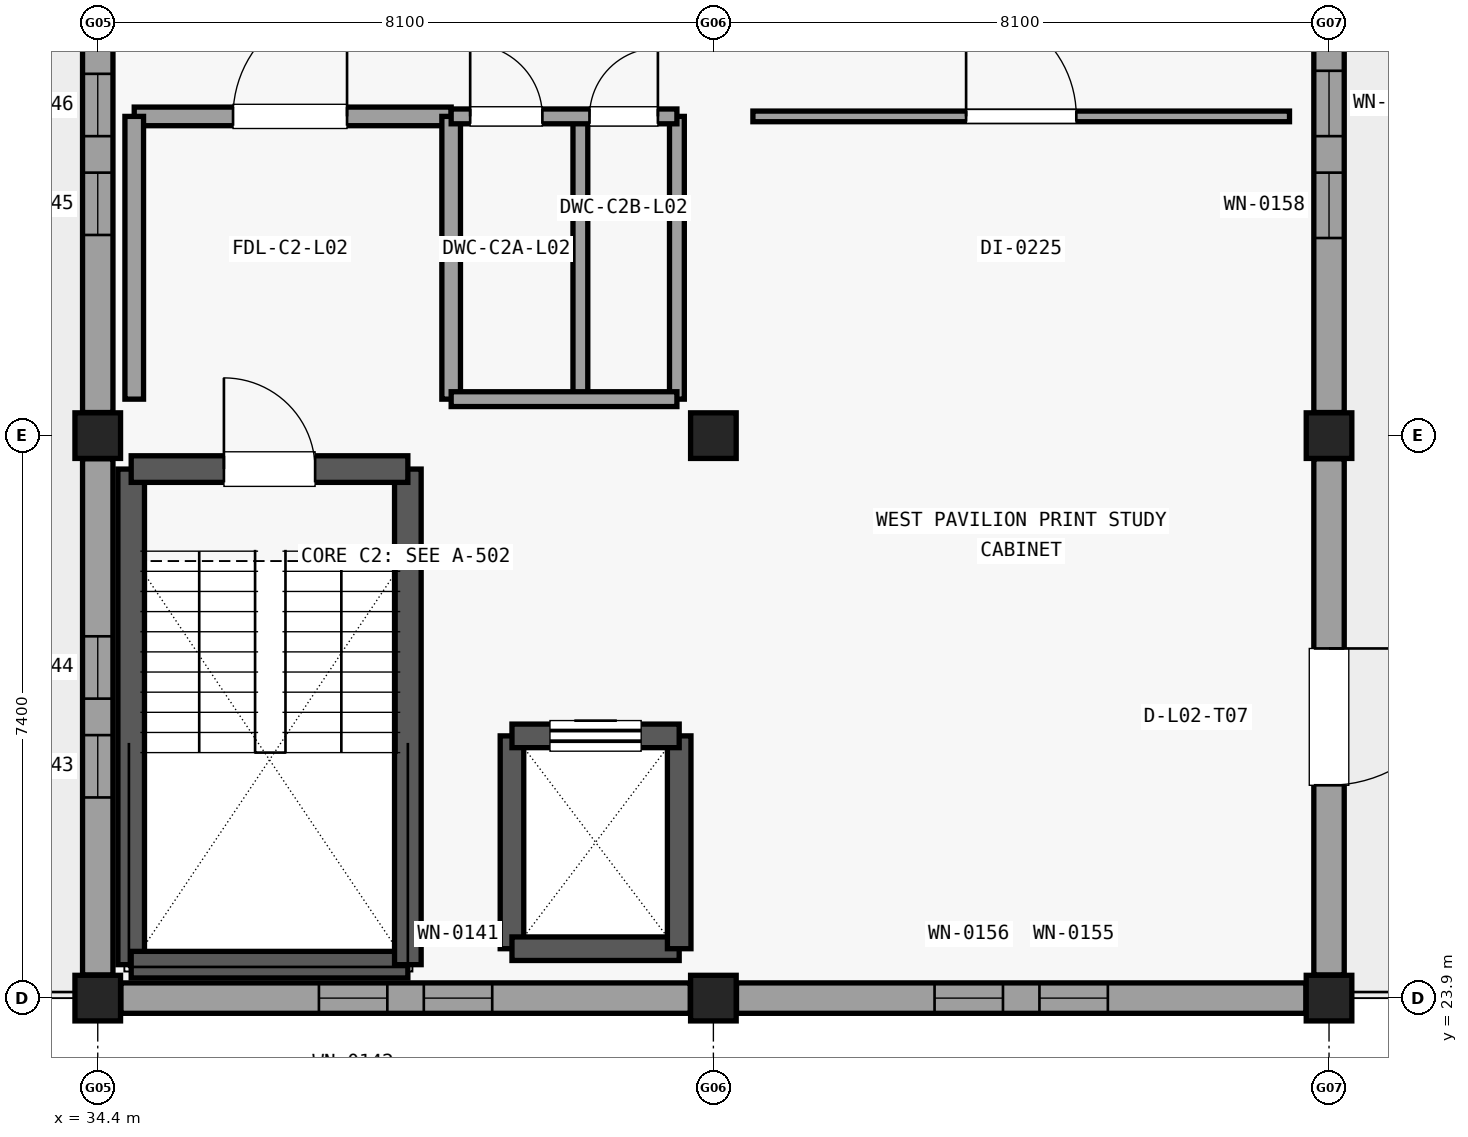
"""IFC4 building model, lengths in metres.
Left out: names, types, materials, properties, quantities, classifications, styles, units other than length and angle.
Written with IfcOpenShell. Run it as: python <this file> out.ifc"""

import sys

from ifc_helpers import new_model, si_unit, direction, frame, frame_2d, origin, origin_2d, place, context, subcontext, project, spatial, rectangle, extrude, element, fill, save


model = new_model("IFC4")
c1 = context("Model", 3, precision=1e-05, world=origin(), true_north=direction((0.0, 1.0)))
c2 = subcontext(c1, "Body", "Model", "MODEL_VIEW")
j1 = project(units=[si_unit("LENGTHUNIT", "METRE"), si_unit("PLANEANGLEUNIT", "RADIAN")], contexts=[c1])
p1 = place(None, origin())
s1 = spatial("IfcSite", under=j1, at=p1, CompositionType="ELEMENT")
p2 = place(p1, origin())
s2 = spatial("IfcBuilding", under=s1, at=p2, CompositionType="ELEMENT")
p3 = place(p2, frame((0.0, 0.0, 10.2)))
s3 = spatial("IfcBuildingStorey", under=s2, at=p3, CompositionType="ELEMENT", Elevation=10.2)
for number, where, z_axis, x_axis in (
    (1, (34.4, 23.9, 0.0), (0.0, 0.0, 1.0), (1.0, 0.0, 0.0)),
    (2, (34.4, 31.3, 0.0), (0.0, 0.0, 1.0), (1.0, 0.0, 0.0)),
    (3, (42.5, 23.9, 0.0), (0.0, 0.0, 1.0), (1.0, 0.0, 0.0)),
    (4, (42.5, 31.3, 0.0), (0.0, 0.0, 1.0), (1.0, 0.0, 0.0)),
    (5, (50.6, 23.9, 0.0), (0.0, 0.0, 1.0), (1.0, 0.0, 0.0)),
    (6, (50.6, 31.3, 0.0), (0.0, 0.0, 1.0), (1.0, 0.0, 0.0)),
):
    element("IfcColumn", number, at=place(p3, frame(where, z_axis=z_axis, x_axis=x_axis)), inside=s3, PredefinedType="COLUMN", context=c2, shape_type="SweptSolid", body=[
        extrude(rectangle(XDim=0.6, YDim=0.6, at=origin_2d()), origin(), (0.0, 0.0, 1.0), 3.37),
    ])
p4 = place(p3, frame((42.196, 23.9, 0.0), z_axis=(0.0, 0.0, 1.0), x_axis=(-1.0, 0.0, 0.0)))
e7 = element("IfcWall", 7, at=p4, inside=s3, PredefinedType="SOLIDWALL", context=c2, shape_type="SweptSolid", body=[
    extrude(rectangle(XDim=7.492, YDim=0.4, at=frame_2d((3.746, 0.0))), origin(), (0.0, 0.0, 1.0), 2.898),
])
p5 = place(p4, frame((2.606, 0.0, 0.6)))
e8 = element("IfcOpeningElement", 8, at=p5, cuts=e7, PredefinedType="OPENING", context=c2, shape_type="SweptSolid", body=[
    extrude(rectangle(XDim=0.9, YDim=1.98, at=frame_2d((0.45, 0.99))), frame((0.0, 0.21, 0.0), z_axis=(0.0, -1.0, 0.0), x_axis=(1.0, 0.0, 0.0)), (0.0, 0.0, 1.0), 0.42),
])
p6 = place(p4, frame((3.986, 0.0, 0.6)))
e9 = element("IfcOpeningElement", 9, at=p6, cuts=e7, PredefinedType="OPENING", context=c2, shape_type="SweptSolid", body=[
    extrude(rectangle(XDim=0.9, YDim=1.98, at=frame_2d((0.45, 0.99))), frame((0.0, 0.21, 0.0), z_axis=(0.0, -1.0, 0.0), x_axis=(1.0, 0.0, 0.0)), (0.0, 0.0, 1.0), 0.42),
])
p7 = place(p3, frame((34.4, 24.204, 0.0), z_axis=(0.0, 0.0, 1.0), x_axis=(0.0, 1.0, 0.0)))
e10 = element("IfcWall", 10, at=p7, inside=s3, PredefinedType="SOLIDWALL", context=c2, shape_type="SweptSolid", body=[
    extrude(rectangle(XDim=6.792, YDim=0.4, at=frame_2d((3.396, 0.0))), origin(), (0.0, 0.0, 1.0), 2.898),
])
p8 = place(p7, frame((2.336, 0.0, 0.6)))
e11 = element("IfcOpeningElement", 11, at=p8, cuts=e10, PredefinedType="OPENING", context=c2, shape_type="SweptSolid", body=[
    extrude(rectangle(XDim=0.82, YDim=2.0, at=frame_2d((0.41, 1.0))), frame((0.0, 0.21, 0.0), z_axis=(0.0, -1.0, 0.0), x_axis=(1.0, 0.0, 0.0)), (0.0, 0.0, 1.0), 0.42),
])
p9 = place(p7, frame((3.636, 0.0, 0.6)))
e12 = element("IfcOpeningElement", 12, at=p9, cuts=e10, PredefinedType="OPENING", context=c2, shape_type="SweptSolid", body=[
    extrude(rectangle(XDim=0.82, YDim=2.0, at=frame_2d((0.41, 1.0))), frame((0.0, 0.21, 0.0), z_axis=(0.0, -1.0, 0.0), x_axis=(1.0, 0.0, 0.0)), (0.0, 0.0, 1.0), 0.42),
])
p10 = place(p3, frame((34.4, 31.604, 0.0), z_axis=(0.0, 0.0, 1.0), x_axis=(0.0, 1.0, 0.0)))
e13 = element("IfcWall", 13, at=p10, inside=s3, PredefinedType="SOLIDWALL", context=c2, shape_type="SweptSolid", body=[
    extrude(rectangle(XDim=6.792, YDim=0.4, at=frame_2d((3.396, 0.0))), origin(), (0.0, 0.0, 1.0), 2.898),
])
p11 = place(p10, frame((2.336, 0.0, 0.6)))
e14 = element("IfcOpeningElement", 14, at=p11, cuts=e13, PredefinedType="OPENING", context=c2, shape_type="SweptSolid", body=[
    extrude(rectangle(XDim=0.82, YDim=2.0, at=frame_2d((0.41, 1.0))), frame((0.0, 0.21, 0.0), z_axis=(0.0, -1.0, 0.0), x_axis=(1.0, 0.0, 0.0)), (0.0, 0.0, 1.0), 0.42),
])
p12 = place(p10, frame((3.636, 0.0, 0.6)))
e15 = element("IfcOpeningElement", 15, at=p12, cuts=e13, PredefinedType="OPENING", context=c2, shape_type="SweptSolid", body=[
    extrude(rectangle(XDim=0.82, YDim=2.0, at=frame_2d((0.41, 1.0))), frame((0.0, 0.21, 0.0), z_axis=(0.0, -1.0, 0.0), x_axis=(1.0, 0.0, 0.0)), (0.0, 0.0, 1.0), 0.42),
])
p13 = place(p3, frame((50.296, 23.9, 0.0), z_axis=(0.0, 0.0, 1.0), x_axis=(-1.0, 0.0, 0.0)))
e16 = element("IfcWall", 16, at=p13, inside=s3, PredefinedType="SOLIDWALL", context=c2, shape_type="SweptSolid", body=[
    extrude(rectangle(XDim=7.492, YDim=0.4, at=frame_2d((3.746, 0.0))), origin(), (0.0, 0.0, 1.0), 2.898),
])
p14 = place(p13, frame((2.606, 0.0, 0.6)))
e17 = element("IfcOpeningElement", 17, at=p14, cuts=e16, PredefinedType="OPENING", context=c2, shape_type="SweptSolid", body=[
    extrude(rectangle(XDim=0.9, YDim=1.98, at=frame_2d((0.45, 0.99))), frame((0.0, 0.21, 0.0), z_axis=(0.0, -1.0, 0.0), x_axis=(1.0, 0.0, 0.0)), (0.0, 0.0, 1.0), 0.42),
])
p15 = place(p13, frame((3.986, 0.0, 0.6)))
e18 = element("IfcOpeningElement", 18, at=p15, cuts=e16, PredefinedType="OPENING", context=c2, shape_type="SweptSolid", body=[
    extrude(rectangle(XDim=0.9, YDim=1.98, at=frame_2d((0.45, 0.99))), frame((0.0, 0.21, 0.0), z_axis=(0.0, -1.0, 0.0), x_axis=(1.0, 0.0, 0.0)), (0.0, 0.0, 1.0), 0.42),
])
p16 = place(p3, frame((50.6, 30.996, 0.0), z_axis=(0.0, 0.0, 1.0), x_axis=(0.0, -1.0, 0.0)))
e19 = element("IfcWall", 19, at=p16, inside=s3, PredefinedType="SOLIDWALL", context=c2, shape_type="SweptSolid", body=[
    extrude(rectangle(XDim=6.792, YDim=0.4, at=frame_2d((3.396, 0.0))), origin(), (0.0, 0.0, 1.0), 2.898),
])
p17 = place(p16, frame((2.496, 0.0, 0.0)))
e20 = element("IfcOpeningElement", 20, at=p17, cuts=e19, PredefinedType="OPENING", context=c2, shape_type="SweptSolid", body=[
    extrude(rectangle(XDim=1.8, YDim=2.2, at=frame_2d((0.9, 1.1))), frame((0.0, 0.21, 0.0), z_axis=(0.0, -1.0, 0.0), x_axis=(1.0, 0.0, 0.0)), (0.0, 0.0, 1.0), 0.42),
])
p18 = place(p3, frame((50.6, 38.396, 0.0), z_axis=(0.0, 0.0, 1.0), x_axis=(0.0, -1.0, 0.0)))
e21 = element("IfcWall", 21, at=p18, inside=s3, PredefinedType="SOLIDWALL", context=c2, shape_type="SweptSolid", body=[
    extrude(rectangle(XDim=6.792, YDim=0.4, at=frame_2d((3.396, 0.0))), origin(), (0.0, 0.0, 1.0), 2.898),
])
p19 = place(p18, frame((2.296, 0.0, 0.6)))
e22 = element("IfcOpeningElement", 22, at=p19, cuts=e21, PredefinedType="OPENING", context=c2, shape_type="SweptSolid", body=[
    extrude(rectangle(XDim=0.86, YDim=2.05, at=frame_2d((0.43, 1.025))), frame((0.0, 0.21, 0.0), z_axis=(0.0, -1.0, 0.0), x_axis=(1.0, 0.0, 0.0)), (0.0, 0.0, 1.0), 0.42),
])
p20 = place(p18, frame((3.636, 0.0, 0.6)))
e23 = element("IfcOpeningElement", 23, at=p20, cuts=e21, PredefinedType="OPENING", context=c2, shape_type="SweptSolid", body=[
    extrude(rectangle(XDim=0.86, YDim=2.05, at=frame_2d((0.43, 1.025))), frame((0.0, 0.21, 0.0), z_axis=(0.0, -1.0, 0.0), x_axis=(1.0, 0.0, 0.0)), (0.0, 0.0, 1.0), 0.42),
])
p21 = place(p3, frame((34.84, 24.34, 0.0), z_axis=(0.0, 0.0, 1.0), x_axis=(0.0, 1.0, 0.0)))
e24 = element("IfcWall", 24, at=p21, inside=s3, PredefinedType="SHEAR", context=c2, shape_type="SweptSolid", body=[
    extrude(rectangle(XDim=6.52, YDim=0.35, at=frame_2d((3.26, 0.0))), origin(), (0.0, 0.0, 1.0), 3.365),
])
p22 = place(p3, frame((34.84, 24.34, 0.0), z_axis=(0.0, 0.0, 1.0), x_axis=(1.0, 0.0, 0.0)))
e25 = element("IfcWall", 25, at=p22, inside=s3, PredefinedType="SHEAR", context=c2, shape_type="SweptSolid", body=[
    extrude(rectangle(XDim=3.64, YDim=0.35, at=frame_2d((1.82, 0.0))), origin(), (0.0, 0.0, 1.0), 3.365),
])
p23 = place(p3, frame((38.48, 24.34, 0.0), z_axis=(0.0, 0.0, 1.0), x_axis=(0.0, 1.0, 0.0)))
e26 = element("IfcWall", 26, at=p23, inside=s3, PredefinedType="SHEAR", context=c2, shape_type="SweptSolid", body=[
    extrude(rectangle(XDim=6.52, YDim=0.35, at=frame_2d((3.26, 0.0))), origin(), (0.0, 0.0, 1.0), 3.365),
])
p24 = place(p3, frame((34.84, 30.86, 0.0), z_axis=(0.0, 0.0, 1.0), x_axis=(1.0, 0.0, 0.0)))
e27 = element("IfcWall", 27, at=p24, inside=s3, PredefinedType="SHEAR", context=c2, shape_type="SweptSolid", body=[
    extrude(rectangle(XDim=3.64, YDim=0.35, at=frame_2d((1.82, 0.0))), origin(), (0.0, 0.0, 1.0), 3.365),
])
p25 = place(p24, frame((1.22, 0.0, 0.0)))
e28 = element("IfcOpeningElement", 28, at=p25, cuts=e27, PredefinedType="OPENING", context=c2, shape_type="SweptSolid", body=[
    extrude(rectangle(XDim=1.2, YDim=2.15, at=frame_2d((0.6, 1.075))), frame((0.0, 0.185, 0.0), z_axis=(0.0, -1.0, 0.0), x_axis=(1.0, 0.0, 0.0)), (0.0, 0.0, 1.0), 0.37),
])
p26 = place(p3, frame((39.85, 24.55, 0.0), z_axis=(0.0, 0.0, 1.0), x_axis=(0.0, 1.0, 0.0)))
e29 = element("IfcWall", 29, at=p26, inside=s3, PredefinedType="SHEAR", context=c2, shape_type="SweptSolid", body=[
    extrude(rectangle(XDim=2.8, YDim=0.31, at=frame_2d((1.4, 0.0))), origin(), (0.0, 0.0, 1.0), 3.365),
])
p27 = place(p3, frame((39.85, 24.55, 0.0), z_axis=(0.0, 0.0, 1.0), x_axis=(1.0, 0.0, 0.0)))
e30 = element("IfcWall", 30, at=p27, inside=s3, PredefinedType="SHEAR", context=c2, shape_type="SweptSolid", body=[
    extrude(rectangle(XDim=2.2, YDim=0.31, at=frame_2d((1.1, 0.0))), origin(), (0.0, 0.0, 1.0), 3.365),
])
p28 = place(p3, frame((42.05, 24.55, 0.0), z_axis=(0.0, 0.0, 1.0), x_axis=(0.0, 1.0, 0.0)))
e31 = element("IfcWall", 31, at=p28, inside=s3, PredefinedType="SHEAR", context=c2, shape_type="SweptSolid", body=[
    extrude(rectangle(XDim=2.8, YDim=0.31, at=frame_2d((1.4, 0.0))), origin(), (0.0, 0.0, 1.0), 3.365),
])
p29 = place(p3, frame((39.85, 27.35, 0.0), z_axis=(0.0, 0.0, 1.0), x_axis=(1.0, 0.0, 0.0)))
e32 = element("IfcWall", 32, at=p29, inside=s3, PredefinedType="SHEAR", context=c2, shape_type="SweptSolid", body=[
    extrude(rectangle(XDim=2.2, YDim=0.31, at=frame_2d((1.1, 0.0))), origin(), (0.0, 0.0, 1.0), 3.365),
])
p30 = place(p29, frame((0.5, 0.0, 0.0)))
e33 = element("IfcOpeningElement", 33, at=p30, cuts=e32, PredefinedType="OPENING", context=c2, shape_type="SweptSolid", body=[
    extrude(rectangle(XDim=1.2, YDim=2.15, at=frame_2d((0.6, 1.075))), frame((0.0, 0.165, 0.0), z_axis=(0.0, -1.0, 0.0), x_axis=(1.0, 0.0, 0.0)), (0.0, 0.0, 1.0), 0.33),
])
p31 = place(p3, frame((34.88, 35.5, 0.0), z_axis=(0.0, 0.0, 1.0), x_axis=(1.0, 0.0, 0.0)))
e34 = element("IfcWall", 34, at=p31, inside=s3, PredefinedType="PARTITIONING", context=c2, shape_type="SweptSolid", body=[
    extrude(rectangle(XDim=4.17, YDim=0.245, at=frame_2d((2.085, 0.0))), origin(), (0.0, 0.0, 1.0), 2.903),
])
p32 = place(p31, frame((1.3, 0.0, 0.0)))
e35 = element("IfcOpeningElement", 35, at=p32, cuts=e34, PredefinedType="OPENING", context=c2, shape_type="SweptSolid", body=[
    extrude(rectangle(XDim=1.5, YDim=2.15, at=frame_2d((0.75, 1.075))), frame((0.0, 0.133, 0.0), z_axis=(0.0, -1.0, 0.0), x_axis=(1.0, 0.0, 0.0)), (0.0, 0.0, 1.0), 0.265),
])
for number, where, z_axis, x_axis in (
    (36, (34.88, 31.78, 0.0), (0.0, 0.0, 1.0), (0.0, 1.0, 0.0)),
    (37, (39.05, 31.78, 0.0), (0.0, 0.0, 1.0), (0.0, 1.0, 0.0)),
):
    element("IfcWall", number, at=place(p3, frame(where, z_axis=z_axis, x_axis=x_axis)), inside=s3, PredefinedType="PARTITIONING", context=c2, shape_type="SweptSolid", body=[
        extrude(rectangle(XDim=3.72, YDim=0.245, at=frame_2d((1.86, 0.0))), origin(), (0.0, 0.0, 1.0), 2.903),
    ])
for number, where, z_axis, x_axis in (
    (38, (40.75, 31.78, 0.0), (0.0, 0.0, 1.0), (0.0, 1.0, 0.0)),
    (39, (42.02, 31.78, 0.0), (0.0, 0.0, 1.0), (0.0, 1.0, 0.0)),
):
    element("IfcWall", number, at=place(p3, frame(where, z_axis=z_axis, x_axis=x_axis)), inside=s3, PredefinedType="PARTITIONING", context=c2, shape_type="SweptSolid", body=[
        extrude(rectangle(XDim=3.72, YDim=0.195, at=frame_2d((1.86, 0.0))), origin(), (0.0, 0.0, 1.0), 2.903),
    ])
p33 = place(p3, frame((39.05, 31.78, 0.0), z_axis=(0.0, 0.0, 1.0), x_axis=(1.0, 0.0, 0.0)))
e40 = element("IfcWall", 40, at=p33, inside=s3, PredefinedType="PARTITIONING", context=c2, shape_type="SweptSolid", body=[
    extrude(rectangle(XDim=2.97, YDim=0.195, at=frame_2d((1.485, 0.0))), origin(), (0.0, 0.0, 1.0), 2.903),
])
p34 = place(p3, frame((39.05, 35.5, 0.0), z_axis=(0.0, 0.0, 1.0), x_axis=(1.0, 0.0, 0.0)))
e41 = element("IfcWall", 41, at=p34, inside=s3, PredefinedType="PARTITIONING", context=c2, shape_type="SweptSolid", body=[
    extrude(rectangle(XDim=2.97, YDim=0.195, at=frame_2d((1.485, 0.0))), origin(), (0.0, 0.0, 1.0), 2.903),
])
p35 = place(p34, frame((0.25, 0.0, 0.0)))
e42 = element("IfcOpeningElement", 42, at=p35, cuts=e41, PredefinedType="OPENING", context=c2, shape_type="SweptSolid", body=[
    extrude(rectangle(XDim=0.95, YDim=2.1, at=frame_2d((0.475, 1.05))), frame((0.0, 0.107, 0.0), z_axis=(0.0, -1.0, 0.0), x_axis=(1.0, 0.0, 0.0)), (0.0, 0.0, 1.0), 0.215),
])
p36 = place(p34, frame((1.82, 0.0, 0.0)))
e43 = element("IfcOpeningElement", 43, at=p36, cuts=e41, PredefinedType="OPENING", context=c2, shape_type="SweptSolid", body=[
    extrude(rectangle(XDim=0.9, YDim=2.1, at=frame_2d((0.45, 1.05))), frame((0.0, 0.107, 0.0), z_axis=(0.0, -1.0, 0.0), x_axis=(1.0, 0.0, 0.0)), (0.0, 0.0, 1.0), 0.215),
])
p37 = place(p3, frame((43.02, 35.5, 0.0), z_axis=(0.0, 0.0, 1.0), x_axis=(1.0, 0.0, 0.0)))
e44 = element("IfcWall", 44, at=p37, inside=s3, PredefinedType="PARTITIONING", context=c2, shape_type="SweptSolid", body=[
    extrude(rectangle(XDim=7.06, YDim=0.14, at=frame_2d((3.53, 0.0))), origin(), (0.0, 0.0, 1.0), 2.903),
])
p38 = place(p37, frame((2.805, 0.0, 0.0)))
e45 = element("IfcOpeningElement", 45, at=p38, cuts=e44, PredefinedType="OPENING", context=c2, shape_type="SweptSolid", body=[
    extrude(rectangle(XDim=1.45, YDim=2.2, at=frame_2d((0.725, 1.1))), frame((0.0, 0.08, 0.0), z_axis=(0.0, -1.0, 0.0), x_axis=(1.0, 0.0, 0.0)), (0.0, 0.0, 1.0), 0.16),
])
p39 = place(p5, origin())
e46 = element("IfcWindow", 46, at=p39, inside=s3, PartitioningType="SINGLE_PANEL", PredefinedType="WINDOW", context=c2, shape_type="SweptSolid", body=[
    extrude(rectangle(XDim=0.9, YDim=1.98, at=frame_2d((0.45, 0.99))), frame((0.0, 0.03, 0.0), z_axis=(0.0, -1.0, 0.0), x_axis=(1.0, 0.0, 0.0)), (0.0, 0.0, 1.0), 0.06),
])
fill(e8, e46)
p40 = place(p6, origin())
e47 = element("IfcWindow", 47, at=p40, inside=s3, PartitioningType="SINGLE_PANEL", PredefinedType="WINDOW", context=c2, shape_type="SweptSolid", body=[
    extrude(rectangle(XDim=0.9, YDim=1.98, at=frame_2d((0.45, 0.99))), frame((0.0, 0.03, 0.0), z_axis=(0.0, -1.0, 0.0), x_axis=(1.0, 0.0, 0.0)), (0.0, 0.0, 1.0), 0.06),
])
fill(e9, e47)
p41 = place(p8, origin())
e48 = element("IfcWindow", 48, at=p41, inside=s3, PartitioningType="SINGLE_PANEL", PredefinedType="WINDOW", context=c2, shape_type="SweptSolid", body=[
    extrude(rectangle(XDim=0.82, YDim=2.0, at=frame_2d((0.41, 1.0))), frame((0.0, 0.03, 0.0), z_axis=(0.0, -1.0, 0.0), x_axis=(1.0, 0.0, 0.0)), (0.0, 0.0, 1.0), 0.06),
])
fill(e11, e48)
p42 = place(p9, origin())
e49 = element("IfcWindow", 49, at=p42, inside=s3, PartitioningType="SINGLE_PANEL", PredefinedType="WINDOW", context=c2, shape_type="SweptSolid", body=[
    extrude(rectangle(XDim=0.82, YDim=2.0, at=frame_2d((0.41, 1.0))), frame((0.0, 0.03, 0.0), z_axis=(0.0, -1.0, 0.0), x_axis=(1.0, 0.0, 0.0)), (0.0, 0.0, 1.0), 0.06),
])
fill(e12, e49)
p43 = place(p11, origin())
e50 = element("IfcWindow", 50, at=p43, inside=s3, PartitioningType="SINGLE_PANEL", PredefinedType="WINDOW", context=c2, shape_type="SweptSolid", body=[
    extrude(rectangle(XDim=0.82, YDim=2.0, at=frame_2d((0.41, 1.0))), frame((0.0, 0.03, 0.0), z_axis=(0.0, -1.0, 0.0), x_axis=(1.0, 0.0, 0.0)), (0.0, 0.0, 1.0), 0.06),
])
fill(e14, e50)
p44 = place(p12, origin())
e51 = element("IfcWindow", 51, at=p44, inside=s3, PartitioningType="SINGLE_PANEL", PredefinedType="WINDOW", context=c2, shape_type="SweptSolid", body=[
    extrude(rectangle(XDim=0.82, YDim=2.0, at=frame_2d((0.41, 1.0))), frame((0.0, 0.03, 0.0), z_axis=(0.0, -1.0, 0.0), x_axis=(1.0, 0.0, 0.0)), (0.0, 0.0, 1.0), 0.06),
])
fill(e15, e51)
p45 = place(p14, origin())
e52 = element("IfcWindow", 52, at=p45, inside=s3, PartitioningType="SINGLE_PANEL", PredefinedType="WINDOW", context=c2, shape_type="SweptSolid", body=[
    extrude(rectangle(XDim=0.9, YDim=1.98, at=frame_2d((0.45, 0.99))), frame((0.0, 0.03, 0.0), z_axis=(0.0, -1.0, 0.0), x_axis=(1.0, 0.0, 0.0)), (0.0, 0.0, 1.0), 0.06),
])
fill(e17, e52)
p46 = place(p15, origin())
e53 = element("IfcWindow", 53, at=p46, inside=s3, PartitioningType="SINGLE_PANEL", PredefinedType="WINDOW", context=c2, shape_type="SweptSolid", body=[
    extrude(rectangle(XDim=0.9, YDim=1.98, at=frame_2d((0.45, 0.99))), frame((0.0, 0.03, 0.0), z_axis=(0.0, -1.0, 0.0), x_axis=(1.0, 0.0, 0.0)), (0.0, 0.0, 1.0), 0.06),
])
fill(e18, e53)
p47 = place(p17, origin())
e54 = element("IfcDoor", 54, at=p47, inside=s3, OperationType="SINGLE_SWING_LEFT", PredefinedType="DOOR", context=c2, shape_type="SweptSolid", body=[
    extrude(rectangle(XDim=1.8, YDim=2.2, at=frame_2d((0.9, 1.1))), frame((0.0, 0.025, 0.0), z_axis=(0.0, -1.0, 0.0), x_axis=(1.0, 0.0, 0.0)), (0.0, 0.0, 1.0), 0.05),
])
fill(e20, e54)
p48 = place(p19, origin())
e55 = element("IfcWindow", 55, at=p48, inside=s3, PartitioningType="SINGLE_PANEL", PredefinedType="WINDOW", context=c2, shape_type="SweptSolid", body=[
    extrude(rectangle(XDim=0.86, YDim=2.05, at=frame_2d((0.43, 1.025))), frame((0.0, 0.03, 0.0), z_axis=(0.0, -1.0, 0.0), x_axis=(1.0, 0.0, 0.0)), (0.0, 0.0, 1.0), 0.06),
])
fill(e22, e55)
p49 = place(p20, origin())
e56 = element("IfcWindow", 56, at=p49, inside=s3, PartitioningType="SINGLE_PANEL", PredefinedType="WINDOW", context=c2, shape_type="SweptSolid", body=[
    extrude(rectangle(XDim=0.86, YDim=2.05, at=frame_2d((0.43, 1.025))), frame((0.0, 0.03, 0.0), z_axis=(0.0, -1.0, 0.0), x_axis=(1.0, 0.0, 0.0)), (0.0, 0.0, 1.0), 0.06),
])
fill(e23, e56)
p50 = place(p25, origin())
e57 = element("IfcDoor", 57, at=p50, inside=s3, OperationType="SINGLE_SWING_LEFT", PredefinedType="DOOR", context=c2, shape_type="SweptSolid", body=[
    extrude(rectangle(XDim=1.2, YDim=2.15, at=frame_2d((0.6, 1.075))), frame((0.0, 0.025, 0.0), z_axis=(0.0, -1.0, 0.0), x_axis=(1.0, 0.0, 0.0)), (0.0, 0.0, 1.0), 0.05),
])
fill(e28, e57)
p51 = place(p30, origin())
e58 = element("IfcDoor", 58, at=p51, inside=s3, OperationType="SLIDING_TO_RIGHT", PredefinedType="DOOR", context=c2, shape_type="SweptSolid", body=[
    extrude(rectangle(XDim=1.2, YDim=2.15, at=frame_2d((0.6, 1.075))), frame((0.0, 0.025, 0.0), z_axis=(0.0, -1.0, 0.0), x_axis=(1.0, 0.0, 0.0)), (0.0, 0.0, 1.0), 0.05),
])
fill(e33, e58)
p52 = place(p32, origin())
e59 = element("IfcDoor", 59, at=p52, inside=s3, OperationType="SINGLE_SWING_RIGHT", PredefinedType="DOOR", context=c2, shape_type="SweptSolid", body=[
    extrude(rectangle(XDim=1.5, YDim=2.15, at=frame_2d((0.75, 1.075))), frame((0.0, 0.025, 0.0), z_axis=(0.0, -1.0, 0.0), x_axis=(1.0, 0.0, 0.0)), (0.0, 0.0, 1.0), 0.05),
])
fill(e35, e59)
p53 = place(p35, origin())
e60 = element("IfcDoor", 60, at=p53, inside=s3, OperationType="SINGLE_SWING_LEFT", PredefinedType="DOOR", context=c2, shape_type="SweptSolid", body=[
    extrude(rectangle(XDim=0.95, YDim=2.1, at=frame_2d((0.475, 1.05))), frame((0.0, 0.025, 0.0), z_axis=(0.0, -1.0, 0.0), x_axis=(1.0, 0.0, 0.0)), (0.0, 0.0, 1.0), 0.05),
])
fill(e42, e60)
p54 = place(p36, origin())
e61 = element("IfcDoor", 61, at=p54, inside=s3, OperationType="SINGLE_SWING_RIGHT", PredefinedType="DOOR", context=c2, shape_type="SweptSolid", body=[
    extrude(rectangle(XDim=0.9, YDim=2.1, at=frame_2d((0.45, 1.05))), frame((0.0, 0.025, 0.0), z_axis=(0.0, -1.0, 0.0), x_axis=(1.0, 0.0, 0.0)), (0.0, 0.0, 1.0), 0.05),
])
fill(e43, e61)
p55 = place(p38, origin())
e62 = element("IfcDoor", 62, at=p55, inside=s3, OperationType="SINGLE_SWING_LEFT", PredefinedType="DOOR", context=c2, shape_type="SweptSolid", body=[
    extrude(rectangle(XDim=1.45, YDim=2.2, at=frame_2d((0.725, 1.1))), frame((0.0, 0.025, 0.0), z_axis=(0.0, -1.0, 0.0), x_axis=(1.0, 0.0, 0.0)), (0.0, 0.0, 1.0), 0.05),
])
fill(e45, e62)
save(model, sys.argv[1])
